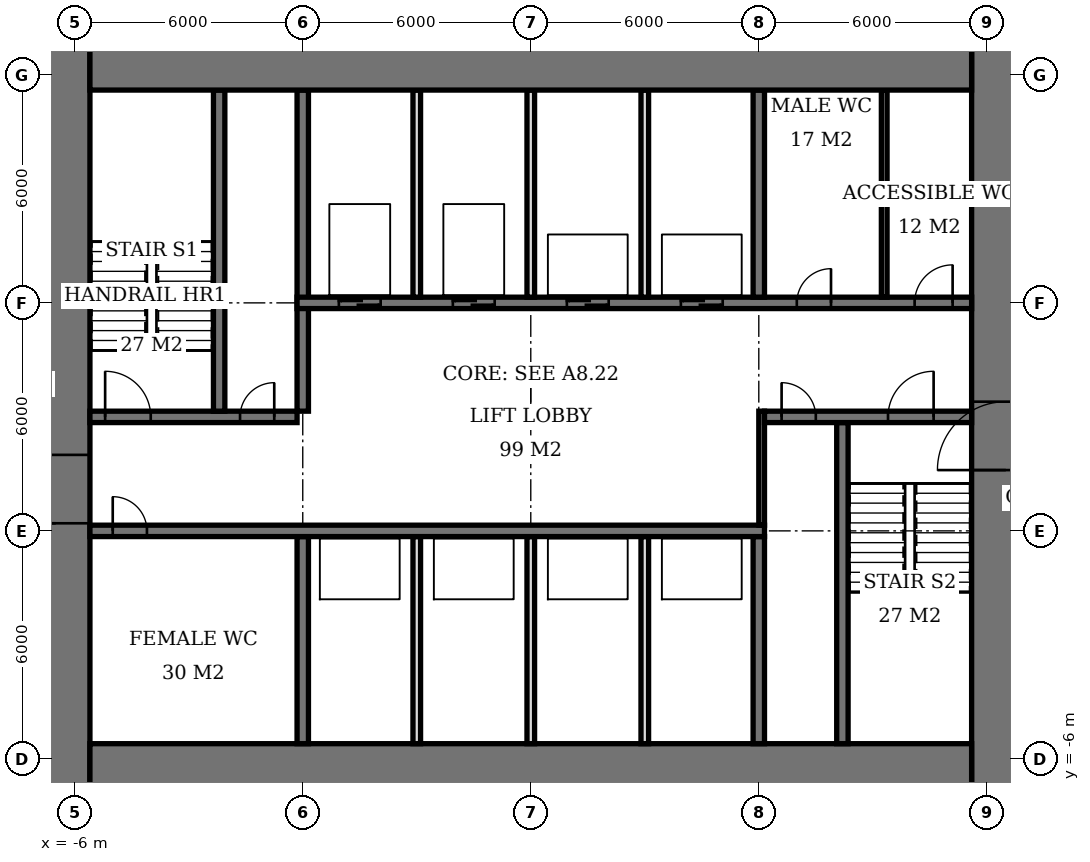
"""IFC4 building model, lengths in metres.
Left out: names, types, materials, properties, quantities, classifications, styles, units other than length and angle.
Written with IfcOpenShell. Run it as: python <this file> out.ifc"""

import sys

from ifc_helpers import new_model, si_unit, direction, frame, frame_2d, origin, place, context, subcontext, project, spatial, rectangle, extrude, element, fill, save


model = new_model("IFC4")
c1 = context("Model", 3, precision=1e-05, world=origin(), true_north=direction((0.0, 1.0)))
c2 = subcontext(c1, "Body", "Model", "MODEL_VIEW")
j1 = project(units=[si_unit("LENGTHUNIT", "METRE"), si_unit("PLANEANGLEUNIT", "RADIAN")], contexts=[c1])
p1 = place(None, origin())
s1 = spatial("IfcSite", under=j1, at=p1, CompositionType="ELEMENT")
p2 = place(p1, origin())
s2 = spatial("IfcBuilding", under=s1, at=p2, CompositionType="ELEMENT")
p3 = place(p2, frame((0.0, 0.0, 33.8)))
s3 = spatial("IfcBuildingStorey", under=s2, at=p3, CompositionType="ELEMENT", Elevation=33.8)
for number, where, z_axis, x_axis in (
    (1, (-5.6, -6.6, 0.0), (0.0, 0.0, 1.0), (1.0, 0.0, 0.0)),
    (2, (-5.6, 12.6, 0.0), (0.0, 0.0, 1.0), (1.0, 0.0, 0.0)),
):
    element("IfcWall", number, at=place(p3, frame(where, z_axis=z_axis, x_axis=x_axis)), inside=s3, PredefinedType="SHEAR", context=c2, shape_type="SweptSolid", body=[
        extrude(rectangle(XDim=23.2, YDim=2.0, at=frame_2d((11.6, 0.0))), origin(), (0.0, 0.0, 1.0), 3.9),
    ])
p4 = place(p3, frame((-6.5, -7.6, 0.0), z_axis=(0.0, 0.0, 1.0), x_axis=(0.0, 1.0, 0.0)))
e3 = element("IfcWall", 3, at=p4, inside=s3, PredefinedType="SHEAR", context=c2, shape_type="SweptSolid", body=[
    extrude(rectangle(XDim=21.2, YDim=1.8, at=frame_2d((10.6, 0.0))), origin(), (0.0, 0.0, 1.0), 3.9),
])
p5 = place(p4, frame((7.8, 0.0, 0.0)))
e4 = element("IfcOpeningElement", 4, at=p5, cuts=e3, PredefinedType="OPENING", context=c2, shape_type="SweptSolid", body=[
    extrude(rectangle(XDim=1.8, YDim=2.4, at=frame_2d((0.9, 1.2))), frame((0.0, 0.91, 0.0), z_axis=(0.0, -1.0, 0.0), x_axis=(1.0, 0.0, 0.0)), (0.0, 0.0, 1.0), 1.82),
])
p6 = place(p3, frame((18.5, -7.6, 0.0), z_axis=(0.0, 0.0, 1.0), x_axis=(0.0, 1.0, 0.0)))
e5 = element("IfcWall", 5, at=p6, inside=s3, PredefinedType="SHEAR", context=c2, shape_type="SweptSolid", body=[
    extrude(rectangle(XDim=21.2, YDim=1.8, at=frame_2d((10.6, 0.0))), origin(), (0.0, 0.0, 1.0), 3.9),
])
p7 = place(p6, frame((9.2, 0.0, 0.0)))
e6 = element("IfcOpeningElement", 6, at=p7, cuts=e5, PredefinedType="OPENING", context=c2, shape_type="SweptSolid", body=[
    extrude(rectangle(XDim=1.8, YDim=2.4, at=frame_2d((0.9, 1.2))), frame((0.0, 0.91, 0.0), z_axis=(0.0, -1.0, 0.0), x_axis=(1.0, 0.0, 0.0)), (0.0, 0.0, 1.0), 1.82),
])
p8 = place(p3, frame((-5.6, 0.0, 0.0), z_axis=(0.0, 0.0, 1.0), x_axis=(1.0, 0.0, 0.0)))
e7 = element("IfcWall", 7, at=p8, inside=s3, PredefinedType="SHEAR", context=c2, shape_type="SweptSolid", body=[
    extrude(rectangle(XDim=17.75, YDim=0.3, at=frame_2d((8.875, 0.0))), origin(), (0.0, 0.0, 1.0), 3.9),
])
p9 = place(p8, frame((0.6, 0.0, 0.0)))
e8 = element("IfcOpeningElement", 8, at=p9, cuts=e7, PredefinedType="OPENING", context=c2, shape_type="SweptSolid", body=[
    extrude(rectangle(XDim=0.9, YDim=2.1, at=frame_2d((0.45, 1.05))), frame((0.0, 0.16, 0.0), z_axis=(0.0, -1.0, 0.0), x_axis=(1.0, 0.0, 0.0)), (0.0, 0.0, 1.0), 0.32),
])
p10 = place(p3, frame((-5.6, 3.0, 0.0), z_axis=(0.0, 0.0, 1.0), x_axis=(1.0, 0.0, 0.0)))
e9 = element("IfcWall", 9, at=p10, inside=s3, PredefinedType="SHEAR", context=c2, shape_type="SweptSolid", body=[
    extrude(rectangle(XDim=5.45, YDim=0.3, at=frame_2d((2.725, 0.0))), origin(), (0.0, 0.0, 1.0), 3.9),
])
p11 = place(p10, frame((0.4, 0.0, 0.0)))
e10 = element("IfcOpeningElement", 10, at=p11, cuts=e9, PredefinedType="OPENING", context=c2, shape_type="SweptSolid", body=[
    extrude(rectangle(XDim=1.2, YDim=2.1, at=frame_2d((0.6, 1.05))), frame((0.0, 0.16, 0.0), z_axis=(0.0, -1.0, 0.0), x_axis=(1.0, 0.0, 0.0)), (0.0, 0.0, 1.0), 0.32),
])
p12 = place(p10, frame((3.95, 0.0, 0.0)))
e11 = element("IfcOpeningElement", 11, at=p12, cuts=e9, PredefinedType="OPENING", context=c2, shape_type="SweptSolid", body=[
    extrude(rectangle(XDim=0.9, YDim=2.1, at=frame_2d((0.45, 1.05))), frame((0.0, 0.16, 0.0), z_axis=(0.0, -1.0, 0.0), x_axis=(1.0, 0.0, 0.0)), (0.0, 0.0, 1.0), 0.32),
])
p13 = place(p3, frame((12.15, 3.0, 0.0), z_axis=(0.0, 0.0, 1.0), x_axis=(1.0, 0.0, 0.0)))
e12 = element("IfcWall", 12, at=p13, inside=s3, PredefinedType="SHEAR", context=c2, shape_type="SweptSolid", body=[
    extrude(rectangle(XDim=5.45, YDim=0.3, at=frame_2d((2.725, 0.0))), origin(), (0.0, 0.0, 1.0), 3.9),
])
p14 = place(p13, frame((3.25, 0.0, 0.0)))
e13 = element("IfcOpeningElement", 13, at=p14, cuts=e12, PredefinedType="OPENING", context=c2, shape_type="SweptSolid", body=[
    extrude(rectangle(XDim=1.2, YDim=2.1, at=frame_2d((0.6, 1.05))), frame((0.0, 0.16, 0.0), z_axis=(0.0, -1.0, 0.0), x_axis=(1.0, 0.0, 0.0)), (0.0, 0.0, 1.0), 0.32),
])
p15 = place(p13, frame((0.45, 0.0, 0.0)))
e14 = element("IfcOpeningElement", 14, at=p15, cuts=e12, PredefinedType="OPENING", context=c2, shape_type="SweptSolid", body=[
    extrude(rectangle(XDim=0.9, YDim=2.1, at=frame_2d((0.45, 1.05))), frame((0.0, 0.16, 0.0), z_axis=(0.0, -1.0, 0.0), x_axis=(1.0, 0.0, 0.0)), (0.0, 0.0, 1.0), 0.32),
])
p16 = place(p3, frame((-0.15, 6.0, 0.0), z_axis=(0.0, 0.0, 1.0), x_axis=(1.0, 0.0, 0.0)))
e15 = element("IfcWall", 15, at=p16, inside=s3, PredefinedType="SHEAR", context=c2, shape_type="SweptSolid", body=[
    extrude(rectangle(XDim=17.75, YDim=0.3, at=frame_2d((8.875, 0.0))), origin(), (0.0, 0.0, 1.0), 3.9),
])
p17 = place(p16, frame((13.15, 0.0, 0.0)))
e16 = element("IfcOpeningElement", 16, at=p17, cuts=e15, PredefinedType="OPENING", context=c2, shape_type="SweptSolid", body=[
    extrude(rectangle(XDim=0.9, YDim=2.1, at=frame_2d((0.45, 1.05))), frame((0.0, 0.16, 0.0), z_axis=(0.0, -1.0, 0.0), x_axis=(1.0, 0.0, 0.0)), (0.0, 0.0, 1.0), 0.32),
])
p18 = place(p16, frame((16.25, 0.0, 0.0)))
e17 = element("IfcOpeningElement", 17, at=p18, cuts=e15, PredefinedType="OPENING", context=c2, shape_type="SweptSolid", body=[
    extrude(rectangle(XDim=1.0, YDim=2.1, at=frame_2d((0.5, 1.05))), frame((0.0, 0.16, 0.0), z_axis=(0.0, -1.0, 0.0), x_axis=(1.0, 0.0, 0.0)), (0.0, 0.0, 1.0), 0.32),
])
p19 = place(p16, frame((1.1, 0.0, 0.0)))
e18 = element("IfcOpeningElement", 18, at=p19, cuts=e15, PredefinedType="OPENING", context=c2, shape_type="SweptSolid", body=[
    extrude(rectangle(XDim=1.1, YDim=2.1, at=frame_2d((0.55, 1.05))), frame((0.0, 0.16, 0.0), z_axis=(0.0, -1.0, 0.0), x_axis=(1.0, 0.0, 0.0)), (0.0, 0.0, 1.0), 0.32),
])
p20 = place(p16, frame((4.1, 0.0, 0.0)))
e19 = element("IfcOpeningElement", 19, at=p20, cuts=e15, PredefinedType="OPENING", context=c2, shape_type="SweptSolid", body=[
    extrude(rectangle(XDim=1.1, YDim=2.1, at=frame_2d((0.55, 1.05))), frame((0.0, 0.16, 0.0), z_axis=(0.0, -1.0, 0.0), x_axis=(1.0, 0.0, 0.0)), (0.0, 0.0, 1.0), 0.32),
])
p21 = place(p16, frame((7.1, 0.0, 0.0)))
e20 = element("IfcOpeningElement", 20, at=p21, cuts=e15, PredefinedType="OPENING", context=c2, shape_type="SweptSolid", body=[
    extrude(rectangle(XDim=1.1, YDim=2.1, at=frame_2d((0.55, 1.05))), frame((0.0, 0.16, 0.0), z_axis=(0.0, -1.0, 0.0), x_axis=(1.0, 0.0, 0.0)), (0.0, 0.0, 1.0), 0.32),
])
p22 = place(p16, frame((10.1, 0.0, 0.0)))
e21 = element("IfcOpeningElement", 21, at=p22, cuts=e15, PredefinedType="OPENING", context=c2, shape_type="SweptSolid", body=[
    extrude(rectangle(XDim=1.1, YDim=2.1, at=frame_2d((0.55, 1.05))), frame((0.0, 0.16, 0.0), z_axis=(0.0, -1.0, 0.0), x_axis=(1.0, 0.0, 0.0)), (0.0, 0.0, 1.0), 0.32),
])
p23 = place(p3, frame((0.0, -5.6, 0.0), z_axis=(0.0, 0.0, 1.0), x_axis=(0.0, 1.0, 0.0)))
e22 = element("IfcWall", 22, at=p23, inside=s3, PredefinedType="SHEAR", context=c2, shape_type="SweptSolid", body=[
    extrude(rectangle(XDim=5.45, YDim=0.3, at=frame_2d((2.725, 0.0))), origin(), (0.0, 0.0, 1.0), 3.9),
])
p24 = place(p3, frame((0.0, 3.15, 0.0), z_axis=(0.0, 0.0, 1.0), x_axis=(0.0, 1.0, 0.0)))
e23 = element("IfcWall", 23, at=p24, inside=s3, PredefinedType="SHEAR", context=c2, shape_type="SweptSolid", body=[
    extrude(rectangle(XDim=8.45, YDim=0.3, at=frame_2d((4.225, 0.0))), origin(), (0.0, 0.0, 1.0), 3.9),
])
for number, where, z_axis, x_axis in (
    (24, (12.0, -5.6, 0.0), (0.0, 0.0, 1.0), (0.0, 1.0, 0.0)),
    (25, (12.0, 6.15, 0.0), (0.0, 0.0, 1.0), (0.0, 1.0, 0.0)),
):
    element("IfcWall", number, at=place(p3, frame(where, z_axis=z_axis, x_axis=x_axis)), inside=s3, PredefinedType="SHEAR", context=c2, shape_type="SweptSolid", body=[
        extrude(rectangle(XDim=5.45, YDim=0.3, at=frame_2d((2.725, 0.0))), origin(), (0.0, 0.0, 1.0), 3.9),
    ])
for number, where, z_axis, x_axis in (
    (26, (-2.2, 3.15, 0.0), (0.0, 0.0, 1.0), (0.0, 1.0, 0.0)),
    (27, (14.2, -5.6, 0.0), (0.0, 0.0, 1.0), (0.0, 1.0, 0.0)),
):
    element("IfcWall", number, at=place(p3, frame(where, z_axis=z_axis, x_axis=x_axis)), inside=s3, PredefinedType="SHEAR", context=c2, shape_type="SweptSolid", body=[
        extrude(rectangle(XDim=8.45, YDim=0.3, at=frame_2d((4.225, 0.0))), origin(), (0.0, 0.0, 1.0), 3.9),
    ])
for number, where, z_axis, x_axis in (
    (28, (3.0, 6.15, 0.0), (0.0, 0.0, 1.0), (0.0, 1.0, 0.0)),
    (29, (6.0, 6.15, 0.0), (0.0, 0.0, 1.0), (0.0, 1.0, 0.0)),
    (30, (9.0, 6.15, 0.0), (0.0, 0.0, 1.0), (0.0, 1.0, 0.0)),
    (31, (3.0, -5.6, 0.0), (0.0, 0.0, 1.0), (0.0, 1.0, 0.0)),
    (32, (6.0, -5.6, 0.0), (0.0, 0.0, 1.0), (0.0, 1.0, 0.0)),
    (33, (9.0, -5.6, 0.0), (0.0, 0.0, 1.0), (0.0, 1.0, 0.0)),
):
    element("IfcWall", number, at=place(p3, frame(where, z_axis=z_axis, x_axis=x_axis)), inside=s3, PredefinedType="SOLIDWALL", context=c2, shape_type="SweptSolid", body=[
        extrude(rectangle(XDim=5.45, YDim=0.2, at=frame_2d((2.725, 0.0))), origin(), (0.0, 0.0, 1.0), 3.9),
    ])
p25 = place(p3, frame((15.3, 6.15, 0.0), z_axis=(0.0, 0.0, 1.0), x_axis=(0.0, 1.0, 0.0)))
e34 = element("IfcWall", 34, at=p25, inside=s3, PredefinedType="PLUMBINGWALL", context=c2, shape_type="SweptSolid", body=[
    extrude(rectangle(XDim=5.45, YDim=0.15, at=frame_2d((2.725, 0.0))), origin(), (0.0, 0.0, 1.0), 3.65),
])
p26 = place(p3, frame((12.075, 0.15, 0.0), z_axis=(0.0, 0.0, 1.0), x_axis=(0.0, 1.0, 0.0)))
e35 = element("IfcWall", 35, at=p26, inside=s3, PredefinedType="PARTITIONING", context=c2, shape_type="SweptSolid", body=[
    extrude(rectangle(XDim=3.0, YDim=0.15, at=frame_2d((1.5, 0.0))), origin(), (0.0, 0.0, 1.0), 3.65),
])
p27 = place(p5, origin())
e36 = element("IfcDoor", 36, at=p27, inside=s3, OperationType="DOUBLE_DOOR_SINGLE_SWING", PredefinedType="DOOR", context=c2, shape_type="SweptSolid", body=[
    extrude(rectangle(XDim=1.8, YDim=2.4, at=frame_2d((0.9, 1.2))), frame((0.0, 0.025, 0.0), z_axis=(0.0, -1.0, 0.0), x_axis=(1.0, 0.0, 0.0)), (0.0, 0.0, 1.0), 0.05),
])
fill(e4, e36)
p28 = place(p7, origin())
e37 = element("IfcDoor", 37, at=p28, inside=s3, OperationType="DOUBLE_DOOR_SINGLE_SWING", PredefinedType="DOOR", context=c2, shape_type="SweptSolid", body=[
    extrude(rectangle(XDim=1.8, YDim=2.4, at=frame_2d((0.9, 1.2))), frame((0.0, 0.025, 0.0), z_axis=(0.0, -1.0, 0.0), x_axis=(1.0, 0.0, 0.0)), (0.0, 0.0, 1.0), 0.05),
])
fill(e6, e37)
p29 = place(p11, origin())
e38 = element("IfcDoor", 38, at=p29, inside=s3, OperationType="SINGLE_SWING_LEFT", PredefinedType="DOOR", context=c2, shape_type="SweptSolid", body=[
    extrude(rectangle(XDim=1.2, YDim=2.1, at=frame_2d((0.6, 1.05))), frame((0.0, 0.025, 0.0), z_axis=(0.0, -1.0, 0.0), x_axis=(1.0, 0.0, 0.0)), (0.0, 0.0, 1.0), 0.05),
])
fill(e10, e38)
p30 = place(p12, origin())
e39 = element("IfcDoor", 39, at=p30, inside=s3, OperationType="SINGLE_SWING_RIGHT", PredefinedType="DOOR", context=c2, shape_type="SweptSolid", body=[
    extrude(rectangle(XDim=0.9, YDim=2.1, at=frame_2d((0.45, 1.05))), frame((0.0, 0.025, 0.0), z_axis=(0.0, -1.0, 0.0), x_axis=(1.0, 0.0, 0.0)), (0.0, 0.0, 1.0), 0.05),
])
fill(e11, e39)
p31 = place(p14, origin())
e40 = element("IfcDoor", 40, at=p31, inside=s3, OperationType="SINGLE_SWING_RIGHT", PredefinedType="DOOR", context=c2, shape_type="SweptSolid", body=[
    extrude(rectangle(XDim=1.2, YDim=2.1, at=frame_2d((0.6, 1.05))), frame((0.0, 0.025, 0.0), z_axis=(0.0, -1.0, 0.0), x_axis=(1.0, 0.0, 0.0)), (0.0, 0.0, 1.0), 0.05),
])
fill(e13, e40)
p32 = place(p15, origin())
e41 = element("IfcDoor", 41, at=p32, inside=s3, OperationType="SINGLE_SWING_LEFT", PredefinedType="DOOR", context=c2, shape_type="SweptSolid", body=[
    extrude(rectangle(XDim=0.9, YDim=2.1, at=frame_2d((0.45, 1.05))), frame((0.0, 0.025, 0.0), z_axis=(0.0, -1.0, 0.0), x_axis=(1.0, 0.0, 0.0)), (0.0, 0.0, 1.0), 0.05),
])
fill(e14, e41)
p33 = place(p9, origin())
e42 = element("IfcDoor", 42, at=p33, inside=s3, OperationType="SINGLE_SWING_LEFT", PredefinedType="DOOR", context=c2, shape_type="SweptSolid", body=[
    extrude(rectangle(XDim=0.9, YDim=2.1, at=frame_2d((0.45, 1.05))), frame((0.0, 0.025, 0.0), z_axis=(0.0, -1.0, 0.0), x_axis=(1.0, 0.0, 0.0)), (0.0, 0.0, 1.0), 0.05),
])
fill(e8, e42)
p34 = place(p17, origin())
e43 = element("IfcDoor", 43, at=p34, inside=s3, OperationType="SINGLE_SWING_RIGHT", PredefinedType="DOOR", context=c2, shape_type="SweptSolid", body=[
    extrude(rectangle(XDim=0.9, YDim=2.1, at=frame_2d((0.45, 1.05))), frame((0.0, 0.025, 0.0), z_axis=(0.0, -1.0, 0.0), x_axis=(1.0, 0.0, 0.0)), (0.0, 0.0, 1.0), 0.05),
])
fill(e16, e43)
p35 = place(p18, origin())
e44 = element("IfcDoor", 44, at=p35, inside=s3, OperationType="SINGLE_SWING_RIGHT", PredefinedType="DOOR", context=c2, shape_type="SweptSolid", body=[
    extrude(rectangle(XDim=1.0, YDim=2.1, at=frame_2d((0.5, 1.05))), frame((0.0, 0.025, 0.0), z_axis=(0.0, -1.0, 0.0), x_axis=(1.0, 0.0, 0.0)), (0.0, 0.0, 1.0), 0.05),
])
fill(e17, e44)
p36 = place(p19, origin())
e45 = element("IfcDoor", 45, at=p36, inside=s3, OperationType="DOUBLE_DOOR_SLIDING", PredefinedType="USERDEFINED", context=c2, shape_type="SweptSolid", body=[
    extrude(rectangle(XDim=1.1, YDim=2.1, at=frame_2d((0.55, 1.05))), frame((0.0, 0.025, 0.0), z_axis=(0.0, -1.0, 0.0), x_axis=(1.0, 0.0, 0.0)), (0.0, 0.0, 1.0), 0.05),
])
fill(e18, e45)
p37 = place(p20, origin())
e46 = element("IfcDoor", 46, at=p37, inside=s3, OperationType="DOUBLE_DOOR_SLIDING", PredefinedType="USERDEFINED", context=c2, shape_type="SweptSolid", body=[
    extrude(rectangle(XDim=1.1, YDim=2.1, at=frame_2d((0.55, 1.05))), frame((0.0, 0.025, 0.0), z_axis=(0.0, -1.0, 0.0), x_axis=(1.0, 0.0, 0.0)), (0.0, 0.0, 1.0), 0.05),
])
fill(e19, e46)
p38 = place(p21, origin())
e47 = element("IfcDoor", 47, at=p38, inside=s3, OperationType="DOUBLE_DOOR_SLIDING", PredefinedType="USERDEFINED", context=c2, shape_type="SweptSolid", body=[
    extrude(rectangle(XDim=1.1, YDim=2.1, at=frame_2d((0.55, 1.05))), frame((0.0, 0.025, 0.0), z_axis=(0.0, -1.0, 0.0), x_axis=(1.0, 0.0, 0.0)), (0.0, 0.0, 1.0), 0.05),
])
fill(e20, e47)
p39 = place(p22, origin())
e48 = element("IfcDoor", 48, at=p39, inside=s3, OperationType="DOUBLE_DOOR_SLIDING", PredefinedType="USERDEFINED", context=c2, shape_type="SweptSolid", body=[
    extrude(rectangle(XDim=1.1, YDim=2.1, at=frame_2d((0.55, 1.05))), frame((0.0, 0.025, 0.0), z_axis=(0.0, -1.0, 0.0), x_axis=(1.0, 0.0, 0.0)), (0.0, 0.0, 1.0), 0.05),
])
fill(e21, e48)
save(model, sys.argv[1])
